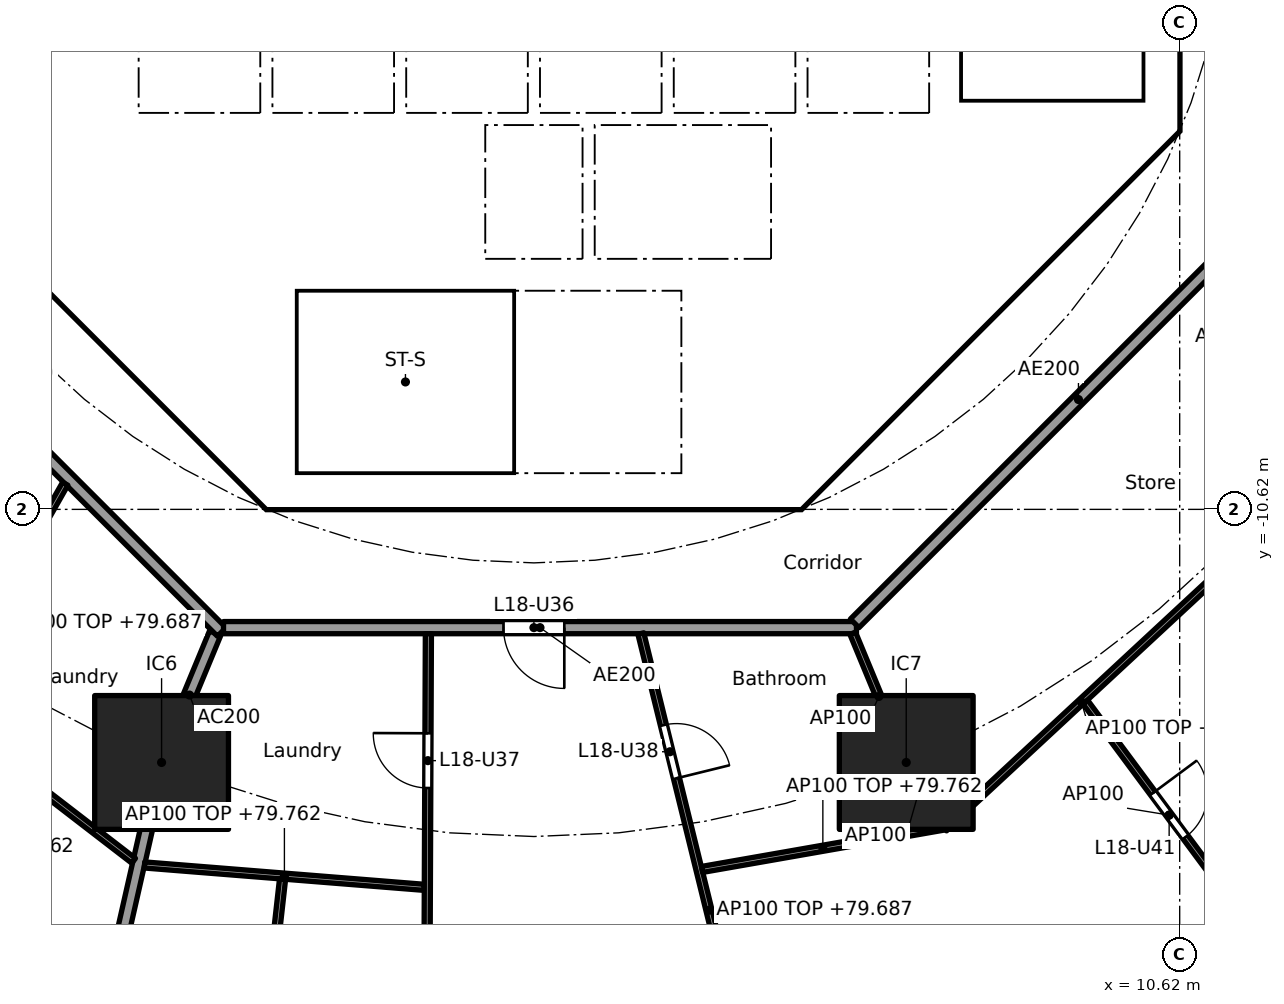
"""IFC4 building model, lengths in metres.
Left out: names, types, materials, properties, quantities, classifications, styles, units other than length and angle.
Written with IfcOpenShell. Run it as: python <this file> out.ifc"""

import sys

from ifc_helpers import new_model, si_unit, direction, frame, frame_2d, origin, origin_2d, place, context, subcontext, project, spatial, polyline, rectangle, outline, extrude, element, fill, save


model = new_model("IFC4")
c1 = context("Model", 3, precision=1e-05, world=origin(), true_north=direction((0.0, 1.0)))
c2 = subcontext(c1, "Body", "Model", "MODEL_VIEW")
j1 = project(units=[si_unit("LENGTHUNIT", "METRE"), si_unit("PLANEANGLEUNIT", "RADIAN")], contexts=[c1])
p1 = place(None, origin())
s1 = spatial("IfcSite", under=j1, at=p1, CompositionType="ELEMENT")
p2 = place(p1, origin())
s2 = spatial("IfcBuilding", under=s1, at=p2, CompositionType="ELEMENT")
p3 = place(p2, frame((0.0, 0.0, 77.0)))
s3 = spatial("IfcBuildingStorey", under=s2, at=p3, CompositionType="ELEMENT", Elevation=77.0)
for number, where, z_axis, x_axis in (
    (1, (-6.123, -14.782, 0.0), (0.0, 0.0, 1.0), (1.0, 0.0, 0.0)),
    (2, (6.123, -14.782, 0.0), (0.0, 0.0, 1.0), (1.0, 0.0, 0.0)),
):
    element("IfcColumn", number, at=place(p3, frame(where, z_axis=z_axis, x_axis=x_axis)), inside=s3, PredefinedType="COLUMN", context=c2, shape_type="SweptSolid", body=[
        extrude(rectangle(XDim=2.2, YDim=2.2, at=origin_2d()), origin(), (0.0, 0.0, 1.0), 3.7),
    ])
p4 = place(p3, frame((-9.988, -4.613, 0.0), z_axis=(0.0, 0.0, 1.0), x_axis=(0.707106781187, -0.707106781187, 0.0)))
e3 = element("IfcWall", 3, at=p4, inside=s3, PredefinedType="SHEAR", context=c2, shape_type="SweptSolid", body=[
    extrude(rectangle(XDim=7.602, YDim=0.6, at=frame_2d((3.801, 0.0))), origin(), (0.0, 0.0, 1.0), 3.44),
])
p5 = place(p4, frame((6.151, 0.0, 0.0)))
e4 = element("IfcOpeningElement", 4, at=p5, cuts=e3, PredefinedType="OPENING", context=c2, shape_type="SweptSolid", body=[
    extrude(rectangle(XDim=1.1, YDim=2.1, at=frame_2d((0.55, 1.05))), frame((0.0, 0.31, 0.0), z_axis=(0.0, -1.0, 0.0), x_axis=(1.0, 0.0, 0.0)), (0.0, 0.0, 1.0), 0.62),
])
p6 = place(p3, frame((4.613, -9.988, 0.0), z_axis=(0.0, 0.0, 1.0), x_axis=(0.707106781187, 0.707106781187, 0.0)))
e5 = element("IfcWall", 5, at=p6, inside=s3, PredefinedType="SHEAR", context=c2, shape_type="SweptSolid", body=[
    extrude(rectangle(XDim=7.602, YDim=0.6, at=frame_2d((3.801, 0.0))), origin(), (0.0, 0.0, 1.0), 3.44),
])
p7 = place(p6, frame((3.201, 0.0, 0.0)))
e6 = element("IfcOpeningElement", 6, at=p7, cuts=e5, PredefinedType="OPENING", context=c2, shape_type="SweptSolid", body=[
    extrude(rectangle(XDim=1.2, YDim=2.1, at=frame_2d((0.6, 1.05))), frame((0.0, 0.31, 0.0), z_axis=(0.0, -1.0, 0.0), x_axis=(1.0, 0.0, 0.0)), (0.0, 0.0, 1.0), 0.62),
])
p8 = place(p3, frame((4.0, -10.025, 0.0), z_axis=(0.0, 0.0, 1.0), x_axis=(0.0, 1.0, 0.0)))
e7 = element("IfcWall", 7, at=p8, inside=s3, PredefinedType="SOLIDWALL", context=c2, shape_type="SweptSolid", body=[
    extrude(rectangle(XDim=3.0, YDim=0.2, at=frame_2d((1.5, 0.0))), origin(), (0.0, 0.0, 1.0), 3.44),
])
p9 = place(p8, frame((0.975, 0.0, 0.0)))
e8 = element("IfcOpeningElement", 8, at=p9, cuts=e7, PredefinedType="OPENING", context=c2, shape_type="SweptSolid", body=[
    extrude(rectangle(XDim=1.1, YDim=2.1, at=frame_2d((0.55, 1.05))), frame((0.0, 0.11, 0.0), z_axis=(0.0, -1.0, 0.0), x_axis=(1.0, 0.0, 0.0)), (0.0, 0.0, 1.0), 0.22),
])
p10 = place(p3, frame((-7.0, -7.027, 0.0), z_axis=(0.0, 0.0, 1.0), x_axis=(0.0, 1.0, 0.0)))
e9 = element("IfcWall", 9, at=p10, inside=s3, PredefinedType="PARTITIONING", context=c2, shape_type="SweptSolid", body=[
    extrude(rectangle(XDim=2.927, YDim=0.15, at=frame_2d((1.463, 0.0))), origin(), (0.0, 0.0, 1.0), 3.44),
])
p11 = place(p10, frame((0.976, 0.0, 0.0)))
e10 = element("IfcOpeningElement", 10, at=p11, cuts=e9, PredefinedType="OPENING", context=c2, shape_type="SweptSolid", body=[
    extrude(rectangle(XDim=0.9, YDim=2.1, at=frame_2d((0.45, 1.05))), frame((0.0, 0.085, 0.0), z_axis=(0.0, -1.0, 0.0), x_axis=(1.0, 0.0, 0.0)), (0.0, 0.0, 1.0), 0.17),
])
p12 = place(p3, frame((4.0, -6.5, 0.0), z_axis=(0.0, 0.0, 1.0), x_axis=(0.0, 1.0, 0.0)))
e11 = element("IfcWall", 11, at=p12, inside=s3, PredefinedType="SOLIDWALL", context=c2, shape_type="SweptSolid", body=[
    extrude(rectangle(XDim=2.2, YDim=0.2, at=frame_2d((1.1, 0.0))), origin(), (0.0, 0.0, 1.0), 3.44),
])
p13 = place(p12, frame((0.55, 0.0, 0.0)))
e12 = element("IfcOpeningElement", 12, at=p13, cuts=e11, PredefinedType="OPENING", context=c2, shape_type="SweptSolid", body=[
    extrude(rectangle(XDim=1.1, YDim=2.1, at=frame_2d((0.55, 1.05))), frame((0.0, 0.11, 0.0), z_axis=(0.0, -1.0, 0.0), x_axis=(1.0, 0.0, 0.0)), (0.0, 0.0, 1.0), 0.22),
])
p14 = place(p3, frame((-4.0, -6.5, 0.0), z_axis=(0.0, 0.0, 1.0), x_axis=(0.0, 1.0, 0.0)))
e13 = element("IfcWall", 13, at=p14, inside=s3, PredefinedType="SOLIDWALL", context=c2, shape_type="SweptSolid", body=[
    extrude(rectangle(XDim=2.2, YDim=0.2, at=frame_2d((1.1, 0.0))), origin(), (0.0, 0.0, 1.0), 3.44),
])
p15 = place(p14, frame((0.65, 0.0, 0.0)))
e14 = element("IfcOpeningElement", 14, at=p15, cuts=e13, PredefinedType="OPENING", context=c2, shape_type="SweptSolid", body=[
    extrude(rectangle(XDim=0.9, YDim=2.1, at=frame_2d((0.45, 1.05))), frame((0.0, 0.11, 0.0), z_axis=(0.0, -1.0, 0.0), x_axis=(1.0, 0.0, 0.0)), (0.0, 0.0, 1.0), 0.22),
])
p16 = place(p3, origin())
e15 = element("IfcWall", 15, at=p16, inside=s3, PredefinedType="SHEAR", context=c2, shape_type="SweptSolid", body=[
    extrude(outline(polyline([(-4.152, -10.025), (4.152, -10.025), (4.401, -9.776), (4.825, -10.2), (4.401, -10.625), (-4.401, -10.625), (-4.825, -10.2), (-4.401, -9.776), (-4.152, -10.025)])), origin(), (0.0, 0.0, 1.0), 3.44),
])
p17 = place(p3, origin())
e16 = element("IfcWall", 16, at=p17, inside=s3, PredefinedType="SHEAR", context=c2, shape_type="SweptSolid", body=[
    extrude(outline(polyline([(9.776, -4.401), (10.025, -4.152), (10.025, -3.801), (10.025, 4.152), (9.776, 4.401), (10.2, 4.825), (10.625, 4.401), (10.625, -4.401), (10.2, -4.825), (9.776, -4.401)])), origin(), (0.0, 0.0, 1.0), 3.44),
])
p18 = place(p3, frame((-10.025, -4.0, 0.0), z_axis=(0.0, 0.0, 1.0), x_axis=(1.0, 0.0, 0.0)))
e17 = element("IfcWall", 17, at=p18, inside=s3, PredefinedType="PARTITIONING", context=c2, shape_type="SweptSolid", body=[
    extrude(rectangle(XDim=3.325, YDim=0.2, at=frame_2d((1.662, 0.0))), origin(), (0.0, 0.0, 1.0), 3.44),
])
for number, where, z_axis, x_axis in (
    (18, (-0.9, -6.5, 0.0), (0.0, 0.0, 1.0), (0.0, 1.0, 0.0)),
    (19, (0.9, -6.5, 0.0), (0.0, 0.0, 1.0), (0.0, 1.0, 0.0)),
):
    element("IfcWall", number, at=place(p3, frame(where, z_axis=z_axis, x_axis=x_axis)), inside=s3, PredefinedType="SOLIDWALL", context=c2, shape_type="SweptSolid", body=[
        extrude(rectangle(XDim=2.2, YDim=0.2, at=frame_2d((1.1, 0.0))), origin(), (0.0, 0.0, 1.0), 3.44),
    ])
p19 = place(p3, origin())
e20 = element("IfcWall", 20, at=p19, inside=s3, PredefinedType="SOLIDWALL", context=c2, shape_type="SweptSolid", body=[
    extrude(outline(polyline([(-6.7, -2.1), (-6.5, -2.1), (-6.5, -4.1), (-4.5, -4.1), (-4.5, -2.1), (-4.3, -2.1), (-4.3, -4.1), (-2.3, -4.1), (-2.3, -2.1), (-2.1, -2.1), (-2.1, -4.1), (-0.1, -4.1), (-0.1, -2.1), (0.1, -2.1), (0.1, -4.1), (2.1, -4.1), (2.1, -2.1), (2.3, -2.1), (2.3, -4.1), (4.3, -4.1), (4.3, -2.1), (4.5, -2.1), (4.5, -4.1), (6.5, -4.1), (6.5, -2.1), (6.7, -2.1), (6.7, -4.3), (-6.7, -4.3), (-6.7, -2.1)])), origin(), (0.0, 0.0, 1.0), 3.44),
])
p20 = place(p3, origin())
e21 = element("IfcWall", 21, at=p20, inside=s3, PredefinedType="SOLIDWALL", context=c2, shape_type="SweptSolid", body=[
    extrude(outline(polyline([(-3.9, -10.025), (-4.1, -10.025), (-4.1, -7.025), (-3.9, -7.025), (-3.9, -10.025)])), origin(), (0.0, 0.0, 1.0), 3.44),
])
p21 = place(p3, origin())
e22 = element("IfcWall", 22, at=p21, inside=s3, PredefinedType="SOLIDWALL", context=c2, shape_type="SweptSolid", body=[
    extrude(outline(polyline([(4.1, -7.025), (-4.1, -7.025), (-4.1, -6.5), (4.1, -6.5), (4.1, -7.025)])), origin(), (0.0, 0.0, 1.0), 3.44),
])
p22 = place(p3, origin())
e23 = element("IfcWall", 23, at=p22, inside=s3, PredefinedType="SOLIDWALL", context=c2, shape_type="SweptSolid", body=[
    extrude(outline(polyline([(7.025, -3.9), (6.7, -3.9), (6.7, 3.9), (7.025, 3.9), (7.025, -3.9)])), origin(), (0.0, 0.0, 1.0), 3.44),
])
p23 = place(p3, origin())
e24 = element("IfcWall", 24, at=p23, inside=s3, PredefinedType="SOLIDWALL", context=c2, shape_type="SweptSolid", body=[
    extrude(outline(polyline([(10.025, -4.1), (6.7, -4.1), (6.7, -3.9), (10.025, -3.9), (10.025, -4.1)])), origin(), (0.0, 0.0, 1.0), 3.44),
])
p24 = place(p3, frame((-5.243, -12.657, 0.0), z_axis=(0.0, 0.0, 1.0), x_axis=(-0.382668627144, -0.923885664896, 0.0)))
e25 = element("IfcWall", 25, at=p24, inside=s3, PredefinedType="PARTITIONING", context=c2, shape_type="SweptSolid", body=[
    extrude(rectangle(XDim=2.2, YDim=0.2, at=frame_2d((1.1, 0.0))), origin(), (0.0, 0.0, 1.0), 3.44),
])
p25 = place(p3, frame((-6.134, -14.831, 0.0), z_axis=(0.0, 0.0, 1.0), x_axis=(-0.221225405869, -0.975222702667, 0.0)))
e26 = element("IfcWall", 26, at=p25, inside=s3, PredefinedType="PARTITIONING", context=c2, shape_type="SweptSolid", body=[
    extrude(rectangle(XDim=11.761, YDim=0.2, at=frame_2d((5.88, 0.0))), origin(), (0.0, 0.0, 1.0), 2.762),
])
p26 = place(p3, frame((-12.635, -5.134, 0.0), z_axis=(0.0, 0.0, 1.0), x_axis=(0.707106781187, -0.707106781187, 0.0)))
e27 = element("IfcWall", 27, at=p26, inside=s3, PredefinedType="PARTITIONING", context=c2, shape_type="SweptSolid", body=[
    extrude(rectangle(XDim=10.609, YDim=0.2, at=frame_2d((5.305, 0.0))), origin(), (0.0, 0.0, 1.0), 3.44),
])
p27 = place(p3, frame((-5.104, -12.565, 0.0), z_axis=(0.0, 0.0, 1.0), x_axis=(1.0, 0.0, 0.0)))
e28 = element("IfcWall", 28, at=p27, inside=s3, PredefinedType="PARTITIONING", context=c2, shape_type="SweptSolid", body=[
    extrude(rectangle(XDim=10.409, YDim=0.2, at=frame_2d((5.205, 0.0))), origin(), (0.0, 0.0, 1.0), 3.44),
])
p28 = place(p27, frame((4.604, 0.0, 0.0)))
e29 = element("IfcOpeningElement", 29, at=p28, cuts=e28, PredefinedType="OPENING", context=c2, shape_type="SweptSolid", body=[
    extrude(rectangle(XDim=1.0, YDim=2.1, at=frame_2d((0.5, 1.05))), frame((0.0, 0.11, 0.0), z_axis=(0.0, -1.0, 0.0), x_axis=(1.0, 0.0, 0.0)), (0.0, 0.0, 1.0), 0.22),
])
p29 = place(p3, frame((5.275, -12.494, 0.0), z_axis=(0.0, 0.0, 1.0), x_axis=(0.707106781187, 0.707106781187, 0.0)))
e30 = element("IfcWall", 30, at=p29, inside=s3, PredefinedType="PARTITIONING", context=c2, shape_type="SweptSolid", body=[
    extrude(rectangle(XDim=10.409, YDim=0.2, at=frame_2d((5.205, 0.0))), origin(), (0.0, 0.0, 1.0), 3.44),
])
p30 = place(p3, frame((-7.707, -10.198, 0.0), z_axis=(0.0, 0.0, 1.0), x_axis=(-0.493986531217, -0.869469554945, 0.0)))
e31 = element("IfcWall", 31, at=p30, inside=s3, PredefinedType="PARTITIONING", context=c2, shape_type="SweptSolid", body=[
    extrude(rectangle(XDim=4.217, YDim=0.1, at=frame_2d((2.109, 0.0))), origin(), (0.0, 0.0, 1.0), 2.687),
])
p31 = place(p3, frame((-9.775, -13.939, 0.0), z_axis=(0.0, 0.0, 1.0), x_axis=(0.792162117554, -0.610310723741, 0.0)))
e32 = element("IfcWall", 32, at=p31, inside=s3, PredefinedType="PARTITIONING", context=c2, shape_type="SweptSolid", body=[
    extrude(rectangle(XDim=4.03, YDim=0.1, at=frame_2d((2.015, 0.0))), origin(), (0.0, 0.0, 1.0), 2.762),
])
p32 = place(p31, frame((0.836, 0.0, 0.0)))
e33 = element("IfcOpeningElement", 33, at=p32, cuts=e32, PredefinedType="OPENING", context=c2, shape_type="SweptSolid", body=[
    extrude(rectangle(XDim=0.9, YDim=2.1, at=frame_2d((0.45, 1.05))), frame((0.0, 0.06, 0.0), z_axis=(0.0, -1.0, 0.0), x_axis=(1.0, 0.0, 0.0)), (0.0, 0.0, 1.0), 0.12),
])
p33 = place(p3, frame((-6.404, -16.468, 0.0), z_axis=(0.0, 0.0, 1.0), x_axis=(0.996818808981, -0.079701079432, 0.0)))
e34 = element("IfcWall", 34, at=p33, inside=s3, PredefinedType="PARTITIONING", context=c2, shape_type="SweptSolid", body=[
    extrude(rectangle(XDim=4.616, YDim=0.1, at=frame_2d((2.308, 0.0))), origin(), (0.0, 0.0, 1.0), 2.762),
])
p34 = place(p3, frame((-4.134, -16.699, 0.0), z_axis=(0.0, 0.0, 1.0), x_axis=(-0.111340048649, -0.993782367305, 0.0)))
e35 = element("IfcWall", 35, at=p34, inside=s3, PredefinedType="PARTITIONING", context=c2, shape_type="SweptSolid", body=[
    extrude(rectangle(XDim=5.309, YDim=0.1, at=frame_2d((2.654, 0.0))), origin(), (0.0, 0.0, 1.0), 3.44),
])
p35 = place(p3, frame((-1.735, -12.665, 0.0), z_axis=(0.0, 0.0, 1.0), x_axis=(-0.004107048833, -0.999991566039, 0.0)))
e36 = element("IfcWall", 36, at=p35, inside=s3, PredefinedType="PARTITIONING", context=c2, shape_type="SweptSolid", body=[
    extrude(rectangle(XDim=14.683, YDim=0.1, at=frame_2d((7.341, 0.0))), origin(), (0.0, 0.0, 1.0), 2.687),
])
p36 = place(p35, frame((1.637, 0.0, 0.0)))
e37 = element("IfcOpeningElement", 37, at=p36, cuts=e36, PredefinedType="OPENING", context=c2, shape_type="SweptSolid", body=[
    extrude(rectangle(XDim=0.9, YDim=2.1, at=frame_2d((0.45, 1.05))), frame((0.0, 0.06, 0.0), z_axis=(0.0, -1.0, 0.0), x_axis=(1.0, 0.0, 0.0)), (0.0, 0.0, 1.0), 0.12),
])
p37 = place(p35, frame((6.496, 0.0, 0.0)))
e38 = element("IfcOpeningElement", 38, at=p37, cuts=e36, PredefinedType="OPENING", context=c2, shape_type="SweptSolid", body=[
    extrude(rectangle(XDim=0.9, YDim=2.1, at=frame_2d((0.45, 1.05))), frame((0.0, 0.06, 0.0), z_axis=(0.0, -1.0, 0.0), x_axis=(1.0, 0.0, 0.0)), (0.0, 0.0, 1.0), 0.12),
])
p38 = place(p35, frame((11.75, 0.0, 0.0)))
e39 = element("IfcOpeningElement", 39, at=p38, cuts=e36, PredefinedType="OPENING", context=c2, shape_type="SweptSolid", body=[
    extrude(rectangle(XDim=0.9, YDim=2.1, at=frame_2d((0.45, 1.05))), frame((0.0, 0.06, 0.0), z_axis=(0.0, -1.0, 0.0), x_axis=(1.0, 0.0, 0.0)), (0.0, 0.0, 1.0), 0.12),
])
p39 = place(p3, frame((1.759, -12.662, 0.0), z_axis=(0.0, 0.0, 1.0), x_axis=(0.239022447434, -0.971014041929, 0.0)))
e40 = element("IfcWall", 40, at=p39, inside=s3, PredefinedType="PARTITIONING", context=c2, shape_type="SweptSolid", body=[
    extrude(rectangle(XDim=9.374, YDim=0.1, at=frame_2d((4.687, 0.0))), origin(), (0.0, 0.0, 1.0), 2.687),
])
p40 = place(p39, frame((1.552, 0.0, 0.0)))
e41 = element("IfcOpeningElement", 41, at=p40, cuts=e40, PredefinedType="OPENING", context=c2, shape_type="SweptSolid", body=[
    extrude(rectangle(XDim=0.9, YDim=2.1, at=frame_2d((0.45, 1.05))), frame((0.0, 0.06, 0.0), z_axis=(0.0, -1.0, 0.0), x_axis=(1.0, 0.0, 0.0)), (0.0, 0.0, 1.0), 0.12),
])
p41 = place(p39, frame((6.214, 0.0, 0.0)))
e42 = element("IfcOpeningElement", 42, at=p41, cuts=e40, PredefinedType="OPENING", context=c2, shape_type="SweptSolid", body=[
    extrude(rectangle(XDim=0.9, YDim=2.1, at=frame_2d((0.45, 1.05))), frame((0.0, 0.06, 0.0), z_axis=(0.0, -1.0, 0.0), x_axis=(1.0, 0.0, 0.0)), (0.0, 0.0, 1.0), 0.12),
])
p42 = place(p3, frame((2.765, -16.541, 0.0), z_axis=(0.0, 0.0, 1.0), x_axis=(0.985002709003, 0.172538874623, 0.0)))
e43 = element("IfcWall", 43, at=p42, inside=s3, PredefinedType="PARTITIONING", context=c2, shape_type="SweptSolid", body=[
    extrude(rectangle(XDim=4.034, YDim=0.1, at=frame_2d((2.017, 0.0))), origin(), (0.0, 0.0, 1.0), 2.762),
])
p43 = place(p3, frame((5.243, -12.657, 0.0), z_axis=(0.0, 0.0, 1.0), x_axis=(0.382719158442, -0.923864733477, 0.0)))
e44 = element("IfcWall", 44, at=p43, inside=s3, PredefinedType="PARTITIONING", context=c2, shape_type="SweptSolid", body=[
    extrude(rectangle(XDim=2.25, YDim=0.1, at=frame_2d((1.125, 0.0))), origin(), (0.0, 0.0, 1.0), 3.44),
])
p44 = place(p3, frame((6.751, -15.87, 0.0), z_axis=(0.0, 0.0, 1.0), x_axis=(0.733003105791, 0.680225291283, 0.0)))
e45 = element("IfcWall", 45, at=p44, inside=s3, PredefinedType="PARTITIONING", context=c2, shape_type="SweptSolid", body=[
    extrude(rectangle(XDim=6.138, YDim=0.1, at=frame_2d((3.069, 0.0))), origin(), (0.0, 0.0, 1.0), 2.762),
])
p45 = place(p3, frame((9.272, -19.868, 0.0), z_axis=(0.0, 0.0, 1.0), x_axis=(0.743884413566, 0.668308296562, 0.0)))
e46 = element("IfcWall", 46, at=p45, inside=s3, PredefinedType="PARTITIONING", context=c2, shape_type="SweptSolid", body=[
    extrude(rectangle(XDim=6.845, YDim=0.1, at=frame_2d((3.423, 0.0))), origin(), (0.0, 0.0, 1.0), 2.762),
])
p46 = place(p3, frame((9.067, -13.789, 0.0), z_axis=(0.0, 0.0, 1.0), x_axis=(0.5958491185, -0.80309640018, 0.0)))
e47 = element("IfcWall", 47, at=p46, inside=s3, PredefinedType="PARTITIONING", context=c2, shape_type="SweptSolid", body=[
    extrude(rectangle(XDim=4.63, YDim=0.1, at=frame_2d((2.315, 0.0))), origin(), (0.0, 0.0, 1.0), 3.44),
])
p47 = place(p46, frame((1.865, 0.0, 0.0)))
e48 = element("IfcOpeningElement", 48, at=p47, cuts=e47, PredefinedType="OPENING", context=c2, shape_type="SweptSolid", body=[
    extrude(rectangle(XDim=0.9, YDim=2.1, at=frame_2d((0.45, 1.05))), frame((0.0, 0.06, 0.0), z_axis=(0.0, -1.0, 0.0), x_axis=(1.0, 0.0, 0.0)), (0.0, 0.0, 1.0), 0.12),
])
p48 = place(p3, frame((6.051, -14.855, 0.0), z_axis=(0.0, 0.0, 1.0), x_axis=(0.533542828537, -0.845773048824, 0.0)))
e49 = element("IfcWall", 49, at=p48, inside=s3, PredefinedType="PARTITIONING", context=c2, shape_type="SweptSolid", body=[
    extrude(rectangle(XDim=1.021, YDim=0.1, at=frame_2d((0.51, 0.0))), origin(), (0.0, 0.0, 1.0), 3.44),
])
p49 = place(p13, origin())
e50 = element("IfcDoor", 50, at=p49, inside=s3, OperationType="DOUBLE_DOOR_SLIDING", PredefinedType="DOOR", context=c2, shape_type="SweptSolid", body=[
    extrude(rectangle(XDim=1.1, YDim=2.1, at=frame_2d((0.55, 1.05))), frame((0.0, 0.025, 0.0), z_axis=(0.0, -1.0, 0.0), x_axis=(1.0, 0.0, 0.0)), (0.0, 0.0, 1.0), 0.05),
])
fill(e12, e50)
p50 = place(p9, origin())
e51 = element("IfcDoor", 51, at=p50, inside=s3, OperationType="SINGLE_SWING_LEFT", PredefinedType="DOOR", context=c2, shape_type="SweptSolid", body=[
    extrude(rectangle(XDim=1.1, YDim=2.1, at=frame_2d((0.55, 1.05))), frame((0.0, 0.025, 0.0), z_axis=(0.0, -1.0, 0.0), x_axis=(1.0, 0.0, 0.0)), (0.0, 0.0, 1.0), 0.05),
])
fill(e8, e51)
p51 = place(p11, origin())
e52 = element("IfcDoor", 52, at=p51, inside=s3, OperationType="SINGLE_SWING_LEFT", PredefinedType="DOOR", context=c2, shape_type="SweptSolid", body=[
    extrude(rectangle(XDim=0.9, YDim=2.1, at=frame_2d((0.45, 1.05))), frame((0.0, 0.025, 0.0), z_axis=(0.0, -1.0, 0.0), x_axis=(1.0, 0.0, 0.0)), (0.0, 0.0, 1.0), 0.05),
])
fill(e10, e52)
p52 = place(p15, frame((0.9, 0.0, 0.0), x_axis=(-1.0, 0.0, 0.0)))
e53 = element("IfcDoor", 53, at=p52, inside=s3, OperationType="SINGLE_SWING_LEFT", PredefinedType="DOOR", context=c2, shape_type="SweptSolid", body=[
    extrude(rectangle(XDim=0.9, YDim=2.1, at=frame_2d((0.45, 1.05))), frame((0.0, 0.025, 0.0), z_axis=(0.0, -1.0, 0.0), x_axis=(1.0, 0.0, 0.0)), (0.0, 0.0, 1.0), 0.05),
])
fill(e14, e53)
p53 = place(p7, origin())
e54 = element("IfcDoor", 54, at=p53, inside=s3, OperationType="SINGLE_SWING_LEFT", PredefinedType="DOOR", context=c2, shape_type="SweptSolid", body=[
    extrude(rectangle(XDim=1.2, YDim=2.1, at=frame_2d((0.6, 1.05))), frame((0.0, 0.025, 0.0), z_axis=(0.0, -1.0, 0.0), x_axis=(1.0, 0.0, 0.0)), (0.0, 0.0, 1.0), 0.05),
])
fill(e6, e54)
p54 = place(p5, origin())
e55 = element("IfcDoor", 55, at=p54, inside=s3, OperationType="SINGLE_SWING_LEFT", PredefinedType="DOOR", context=c2, shape_type="SweptSolid", body=[
    extrude(rectangle(XDim=1.1, YDim=2.1, at=frame_2d((0.55, 1.05))), frame((0.0, 0.025, 0.0), z_axis=(0.0, -1.0, 0.0), x_axis=(1.0, 0.0, 0.0)), (0.0, 0.0, 1.0), 0.05),
])
fill(e4, e55)
p55 = place(p28, frame((1.0, 0.0, 0.0), x_axis=(-1.0, 0.0, 0.0)))
e56 = element("IfcDoor", 56, at=p55, inside=s3, OperationType="SINGLE_SWING_LEFT", PredefinedType="DOOR", context=c2, shape_type="SweptSolid", body=[
    extrude(rectangle(XDim=1.0, YDim=2.1, at=frame_2d((0.5, 1.05))), frame((0.0, 0.025, 0.0), z_axis=(0.0, -1.0, 0.0), x_axis=(1.0, 0.0, 0.0)), (0.0, 0.0, 1.0), 0.05),
])
fill(e29, e56)
p56 = place(p36, frame((0.9, 0.0, 0.0), x_axis=(-1.0, 0.0, 0.0)))
e57 = element("IfcDoor", 57, at=p56, inside=s3, OperationType="SINGLE_SWING_RIGHT", PredefinedType="DOOR", context=c2, shape_type="SweptSolid", body=[
    extrude(rectangle(XDim=0.9, YDim=2.1, at=frame_2d((0.45, 1.05))), frame((0.0, 0.025, 0.0), z_axis=(0.0, -1.0, 0.0), x_axis=(1.0, 0.0, 0.0)), (0.0, 0.0, 1.0), 0.05),
])
fill(e37, e57)
p57 = place(p40, origin())
e58 = element("IfcDoor", 58, at=p57, inside=s3, OperationType="SINGLE_SWING_RIGHT", PredefinedType="DOOR", context=c2, shape_type="SweptSolid", body=[
    extrude(rectangle(XDim=0.9, YDim=2.1, at=frame_2d((0.45, 1.05))), frame((0.0, 0.025, 0.0), z_axis=(0.0, -1.0, 0.0), x_axis=(1.0, 0.0, 0.0)), (0.0, 0.0, 1.0), 0.05),
])
fill(e41, e58)
p58 = place(p47, origin())
e59 = element("IfcDoor", 59, at=p58, inside=s3, OperationType="SINGLE_SWING_LEFT", PredefinedType="DOOR", context=c2, shape_type="SweptSolid", body=[
    extrude(rectangle(XDim=0.9, YDim=2.1, at=frame_2d((0.45, 1.05))), frame((0.0, 0.025, 0.0), z_axis=(0.0, -1.0, 0.0), x_axis=(1.0, 0.0, 0.0)), (0.0, 0.0, 1.0), 0.05),
])
fill(e48, e59)
save(model, sys.argv[1])
